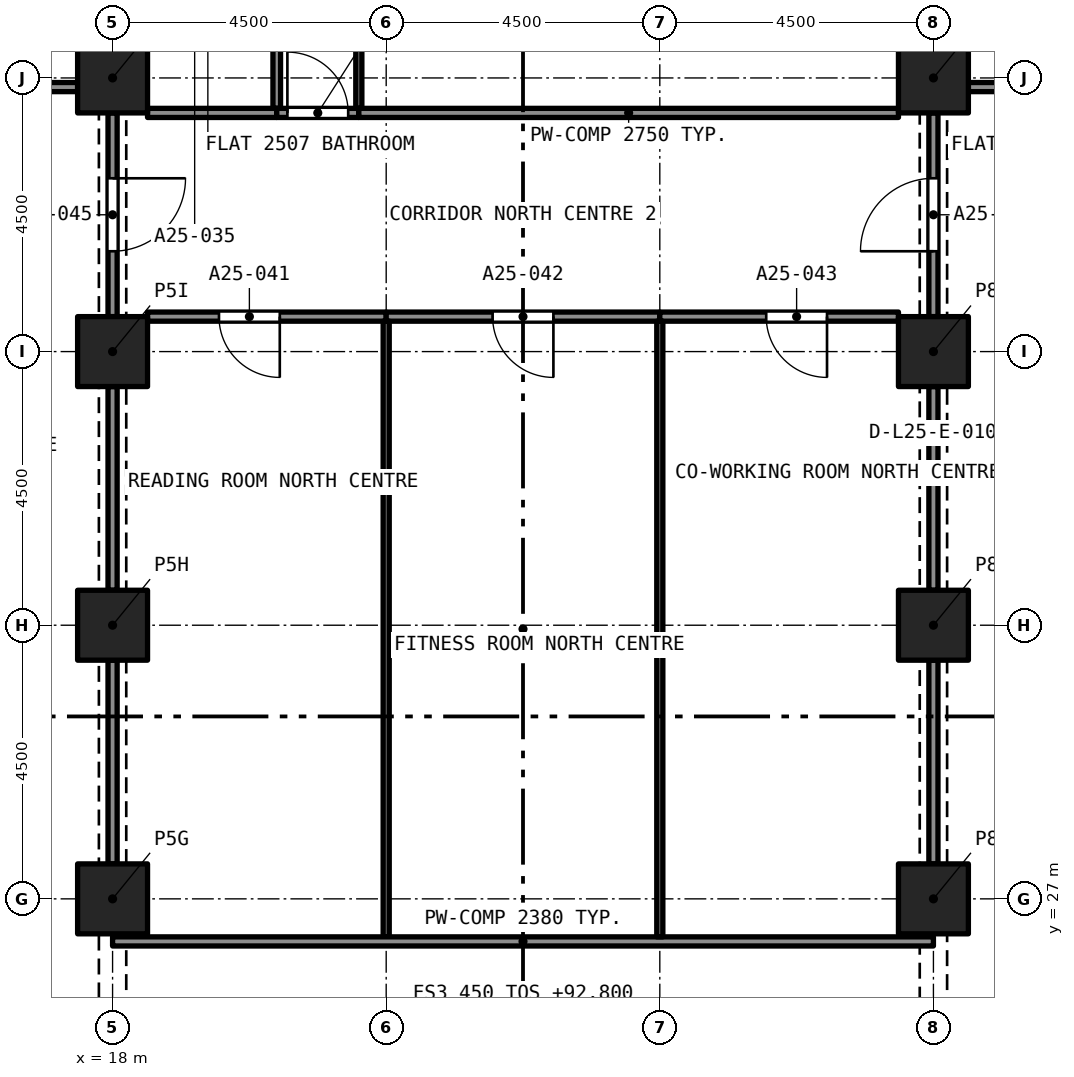
"""IFC4 building model, lengths in metres.
Left out: names, types, materials, properties, quantities, classifications, styles, units other than length and angle.
Written with IfcOpenShell. Run it as: python <this file> out.ifc"""

import sys

from ifc_helpers import new_model, si_unit, direction, frame, frame_2d, origin, origin_2d, place, context, subcontext, project, spatial, rectangle, extrude, element, fill, save


model = new_model("IFC4")
c1 = context("Model", 3, precision=1e-05, world=origin(), true_north=direction((0.0, 1.0)))
c2 = subcontext(c1, "Body", "Model", "MODEL_VIEW")
j1 = project(units=[si_unit("LENGTHUNIT", "METRE"), si_unit("PLANEANGLEUNIT", "RADIAN")], contexts=[c1])
p1 = place(None, origin())
s1 = spatial("IfcSite", under=j1, at=p1, CompositionType="ELEMENT")
p2 = place(p1, origin())
s2 = spatial("IfcBuilding", under=s1, at=p2, CompositionType="ELEMENT")
p3 = place(p2, frame((0.0, 0.0, 92.8)))
s3 = spatial("IfcBuildingStorey", under=s2, at=p3, CompositionType="ELEMENT", Elevation=92.8)
for number, where, z_axis, x_axis in (
    (1, (18.0, 27.0, 0.0), (0.0, 0.0, 1.0), (1.0, 0.0, 0.0)),
    (2, (31.5, 27.0, 0.0), (0.0, 0.0, 1.0), (1.0, 0.0, 0.0)),
    (3, (18.0, 31.5, 0.0), (0.0, 0.0, 1.0), (1.0, 0.0, 0.0)),
    (4, (31.5, 31.5, 0.0), (0.0, 0.0, 1.0), (1.0, 0.0, 0.0)),
    (5, (18.0, 36.0, 0.0), (0.0, 0.0, 1.0), (1.0, 0.0, 0.0)),
    (6, (31.5, 36.0, 0.0), (0.0, 0.0, 1.0), (1.0, 0.0, 0.0)),
    (7, (18.0, 40.5, 0.0), (0.0, 0.0, 1.0), (1.0, 0.0, 0.0)),
    (8, (31.5, 40.5, 0.0), (0.0, 0.0, 1.0), (1.0, 0.0, 0.0)),
):
    element("IfcColumn", number, at=place(p3, frame(where, z_axis=z_axis, x_axis=x_axis)), inside=s3, PredefinedType="COLUMN", context=c2, shape_type="SweptSolid", body=[
        extrude(rectangle(XDim=1.15, YDim=1.15, at=origin_2d()), origin(), (0.0, 0.0, 1.0), 3.2),
    ])
p4 = place(p3, frame((13.35, 40.35, 0.0), z_axis=(0.0, 0.0, 1.0), x_axis=(1.0, 0.0, 0.0)))
e9 = element("IfcWall", 9, at=p4, inside=s3, PredefinedType="PARTITIONING", context=c2, shape_type="SweptSolid", body=[
    extrude(rectangle(XDim=4.075, YDim=0.15, at=frame_2d((2.038, 0.0))), origin(), (0.0, 0.0, 1.0), 2.9),
])
p5 = place(p3, frame((32.075, 40.35, 0.0), z_axis=(0.0, 0.0, 1.0), x_axis=(1.0, 0.0, 0.0)))
e10 = element("IfcWall", 10, at=p5, inside=s3, PredefinedType="PARTITIONING", context=c2, shape_type="SweptSolid", body=[
    extrude(rectangle(XDim=2.35, YDim=0.15, at=frame_2d((1.175, 0.0))), origin(), (0.0, 0.0, 1.0), 2.9),
])
p6 = place(p5, frame((1.175, 0.0, 0.0)))
e11 = element("IfcOpeningElement", 11, at=p6, cuts=e10, PredefinedType="OPENING", context=c2, shape_type="SweptSolid", body=[
    extrude(rectangle(XDim=1.0, YDim=2.1, at=frame_2d((0.5, 1.05))), frame((0.0, 0.085, 0.0), z_axis=(0.0, -1.0, 0.0), x_axis=(1.0, 0.0, 0.0)), (0.0, 0.0, 1.0), 0.17),
])
p7 = place(p3, frame((20.7, 40.0, 0.0), z_axis=(0.0, 0.0, 1.0), x_axis=(0.0, 1.0, 0.0)))
e12 = element("IfcWall", 12, at=p7, inside=s3, PredefinedType="PARTITIONING", context=c2, shape_type="SweptSolid", body=[
    extrude(rectangle(XDim=2.073, YDim=0.125, at=frame_2d((1.036, 0.0))), origin(), (0.0, 0.0, 1.0), 2.75),
])
p8 = place(p3, frame((18.575, 39.925, 0.0), z_axis=(0.0, 0.0, 1.0), x_axis=(1.0, 0.0, 0.0)))
e13 = element("IfcWall", 13, at=p8, inside=s3, PredefinedType="PARTITIONING", context=c2, shape_type="SweptSolid", body=[
    extrude(rectangle(XDim=2.125, YDim=0.15, at=frame_2d((1.062, 0.0))), origin(), (0.0, 0.0, 1.0), 2.75),
])
p9 = place(p3, frame((22.05, 40.0, 0.0), z_axis=(0.0, 0.0, 1.0), x_axis=(0.0, 1.0, 0.0)))
e14 = element("IfcWall", 14, at=p9, inside=s3, PredefinedType="PARTITIONING", context=c2, shape_type="SweptSolid", body=[
    extrude(rectangle(XDim=2.085, YDim=0.1, at=frame_2d((1.042, 0.0))), origin(), (0.0, 0.0, 1.0), 2.75),
])
p10 = place(p3, frame((20.7, 39.925, 0.0), z_axis=(0.0, 0.0, 1.0), x_axis=(1.0, 0.0, 0.0)))
e15 = element("IfcWall", 15, at=p10, inside=s3, PredefinedType="PARTITIONING", context=c2, shape_type="SweptSolid", body=[
    extrude(rectangle(XDim=1.35, YDim=0.15, at=frame_2d((0.675, 0.0))), origin(), (0.0, 0.0, 1.0), 2.75),
])
p11 = place(p10, frame((0.175, 0.0, 0.0)))
e16 = element("IfcOpeningElement", 16, at=p11, cuts=e15, PredefinedType="OPENING", context=c2, shape_type="SweptSolid", body=[
    extrude(rectangle(XDim=1.0, YDim=2.1, at=frame_2d((0.5, 1.05))), frame((0.0, 0.085, 0.0), z_axis=(0.0, -1.0, 0.0), x_axis=(1.0, 0.0, 0.0)), (0.0, 0.0, 1.0), 0.17),
])
p12 = place(p3, frame((22.05, 39.925, 0.0), z_axis=(0.0, 0.0, 1.0), x_axis=(1.0, 0.0, 0.0)))
e17 = element("IfcWall", 17, at=p12, inside=s3, PredefinedType="PARTITIONING", context=c2, shape_type="SweptSolid", body=[
    extrude(rectangle(XDim=8.875, YDim=0.15, at=frame_2d((4.438, 0.0))), origin(), (0.0, 0.0, 1.0), 2.75),
])
p13 = place(p3, frame((22.5, 36.575, 0.0), z_axis=(0.0, 0.0, 1.0), x_axis=(-1.0, 0.0, 0.0)))
e18 = element("IfcWall", 18, at=p13, inside=s3, PredefinedType="PARTITIONING", context=c2, shape_type="SweptSolid", body=[
    extrude(rectangle(XDim=3.925, YDim=0.15, at=frame_2d((1.962, 0.0))), origin(), (0.0, 0.0, 1.0), 2.75),
])
p14 = place(p13, frame((1.75, 0.0, 0.0)))
e19 = element("IfcOpeningElement", 19, at=p14, cuts=e18, PredefinedType="OPENING", context=c2, shape_type="SweptSolid", body=[
    extrude(rectangle(XDim=1.0, YDim=2.1, at=frame_2d((0.5, 1.05))), frame((0.0, 0.085, 0.0), z_axis=(0.0, -1.0, 0.0), x_axis=(1.0, 0.0, 0.0)), (0.0, 0.0, 1.0), 0.17),
])
p15 = place(p3, frame((27.0, 36.575, 0.0), z_axis=(0.0, 0.0, 1.0), x_axis=(-1.0, 0.0, 0.0)))
e20 = element("IfcWall", 20, at=p15, inside=s3, PredefinedType="PARTITIONING", context=c2, shape_type="SweptSolid", body=[
    extrude(rectangle(XDim=4.5, YDim=0.15, at=frame_2d((2.25, 0.0))), origin(), (0.0, 0.0, 1.0), 2.75),
])
p16 = place(p15, frame((1.75, 0.0, 0.0)))
e21 = element("IfcOpeningElement", 21, at=p16, cuts=e20, PredefinedType="OPENING", context=c2, shape_type="SweptSolid", body=[
    extrude(rectangle(XDim=1.0, YDim=2.1, at=frame_2d((0.5, 1.05))), frame((0.0, 0.085, 0.0), z_axis=(0.0, -1.0, 0.0), x_axis=(1.0, 0.0, 0.0)), (0.0, 0.0, 1.0), 0.17),
])
p17 = place(p3, frame((30.925, 36.575, 0.0), z_axis=(0.0, 0.0, 1.0), x_axis=(-1.0, 0.0, 0.0)))
e22 = element("IfcWall", 22, at=p17, inside=s3, PredefinedType="PARTITIONING", context=c2, shape_type="SweptSolid", body=[
    extrude(rectangle(XDim=3.925, YDim=0.15, at=frame_2d((1.962, 0.0))), origin(), (0.0, 0.0, 1.0), 2.75),
])
p18 = place(p17, frame((1.175, 0.0, 0.0)))
e23 = element("IfcOpeningElement", 23, at=p18, cuts=e22, PredefinedType="OPENING", context=c2, shape_type="SweptSolid", body=[
    extrude(rectangle(XDim=1.0, YDim=2.1, at=frame_2d((0.5, 1.05))), frame((0.0, 0.085, 0.0), z_axis=(0.0, -1.0, 0.0), x_axis=(1.0, 0.0, 0.0)), (0.0, 0.0, 1.0), 0.17),
])
p19 = place(p3, frame((31.5, 36.575, 0.0), z_axis=(0.0, 0.0, 1.0), x_axis=(0.0, 1.0, 0.0)))
e24 = element("IfcWall", 24, at=p19, inside=s3, PredefinedType="PARTITIONING", context=c2, shape_type="SweptSolid", body=[
    extrude(rectangle(XDim=3.35, YDim=0.15, at=frame_2d((1.675, 0.0))), origin(), (0.0, 0.0, 1.0), 2.38),
])
p20 = place(p19, frame((1.075, 0.0, 0.0)))
e25 = element("IfcOpeningElement", 25, at=p20, cuts=e24, PredefinedType="OPENING", context=c2, shape_type="SweptSolid", body=[
    extrude(rectangle(XDim=1.2, YDim=2.1, at=frame_2d((0.6, 1.05))), frame((0.0, 0.085, 0.0), z_axis=(0.0, -1.0, 0.0), x_axis=(1.0, 0.0, 0.0)), (0.0, 0.0, 1.0), 0.17),
])
p21 = place(p3, frame((18.0, 39.925, 0.0), z_axis=(0.0, 0.0, 1.0), x_axis=(0.0, -1.0, 0.0)))
e26 = element("IfcWall", 26, at=p21, inside=s3, PredefinedType="PARTITIONING", context=c2, shape_type="SweptSolid", body=[
    extrude(rectangle(XDim=3.35, YDim=0.15, at=frame_2d((1.675, 0.0))), origin(), (0.0, 0.0, 1.0), 2.38),
])
p22 = place(p21, frame((1.075, 0.0, 0.0)))
e27 = element("IfcOpeningElement", 27, at=p22, cuts=e26, PredefinedType="OPENING", context=c2, shape_type="SweptSolid", body=[
    extrude(rectangle(XDim=1.2, YDim=2.1, at=frame_2d((0.6, 1.05))), frame((0.0, 0.085, 0.0), z_axis=(0.0, -1.0, 0.0), x_axis=(1.0, 0.0, 0.0)), (0.0, 0.0, 1.0), 0.17),
])
p23 = place(p3, frame((22.5, 26.375, 0.0), z_axis=(0.0, 0.0, 1.0), x_axis=(0.0, 1.0, 0.0)))
e28 = element("IfcWall", 28, at=p23, inside=s3, PredefinedType="PARTITIONING", context=c2, shape_type="SweptSolid", body=[
    extrude(rectangle(XDim=10.125, YDim=0.1, at=frame_2d((5.062, 0.0))), origin(), (0.0, 0.0, 1.0), 2.75),
])
for number, where, z_axis, x_axis in (
    (29, (18.0, 27.575, 0.0), (0.0, 0.0, 1.0), (0.0, 1.0, 0.0)),
    (30, (18.0, 32.075, 0.0), (0.0, 0.0, 1.0), (0.0, 1.0, 0.0)),
):
    element("IfcWall", number, at=place(p3, frame(where, z_axis=z_axis, x_axis=x_axis)), inside=s3, PredefinedType="PARTITIONING", context=c2, shape_type="SweptSolid", body=[
        extrude(rectangle(XDim=3.35, YDim=0.15, at=frame_2d((1.675, 0.0))), origin(), (0.0, 0.0, 1.0), 2.38),
    ])
p24 = place(p3, frame((18.0, 26.3, 0.0), z_axis=(0.0, 0.0, 1.0), x_axis=(1.0, 0.0, 0.0)))
e31 = element("IfcWall", 31, at=p24, inside=s3, PredefinedType="PARTITIONING", context=c2, shape_type="SweptSolid", body=[
    extrude(rectangle(XDim=13.5, YDim=0.15, at=frame_2d((6.75, 0.0))), origin(), (0.0, 0.0, 1.0), 2.38),
])
p25 = place(p3, frame((27.0, 26.375, 0.0), z_axis=(0.0, 0.0, 1.0), x_axis=(0.0, 1.0, 0.0)))
e32 = element("IfcWall", 32, at=p25, inside=s3, PredefinedType="PARTITIONING", context=c2, shape_type="SweptSolid", body=[
    extrude(rectangle(XDim=10.125, YDim=0.1, at=frame_2d((5.062, 0.0))), origin(), (0.0, 0.0, 1.0), 2.75),
])
for number, where, z_axis, x_axis in (
    (33, (31.5, 32.075, 0.0), (0.0, 0.0, 1.0), (0.0, 1.0, 0.0)),
    (34, (31.5, 27.575, 0.0), (0.0, 0.0, 1.0), (0.0, 1.0, 0.0)),
):
    element("IfcWall", number, at=place(p3, frame(where, z_axis=z_axis, x_axis=x_axis)), inside=s3, PredefinedType="PARTITIONING", context=c2, shape_type="SweptSolid", body=[
        extrude(rectangle(XDim=3.35, YDim=0.15, at=frame_2d((1.675, 0.0))), origin(), (0.0, 0.0, 1.0), 2.38),
    ])
p26 = place(p11, origin())
e35 = element("IfcDoor", 35, at=p26, inside=s3, OperationType="SINGLE_SWING_RIGHT", PredefinedType="DOOR", context=c2, shape_type="SweptSolid", body=[
    extrude(rectangle(XDim=1.0, YDim=2.1, at=frame_2d((0.5, 1.05))), frame((0.0, 0.025, 0.0), z_axis=(0.0, -1.0, 0.0), x_axis=(1.0, 0.0, 0.0)), (0.0, 0.0, 1.0), 0.05),
])
fill(e16, e35)
p27 = place(p14, origin())
e36 = element("IfcDoor", 36, at=p27, inside=s3, OperationType="SINGLE_SWING_RIGHT", PredefinedType="DOOR", context=c2, shape_type="SweptSolid", body=[
    extrude(rectangle(XDim=1.0, YDim=2.1, at=frame_2d((0.5, 1.05))), frame((0.0, 0.025, 0.0), z_axis=(0.0, -1.0, 0.0), x_axis=(1.0, 0.0, 0.0)), (0.0, 0.0, 1.0), 0.05),
])
fill(e19, e36)
p28 = place(p16, origin())
e37 = element("IfcDoor", 37, at=p28, inside=s3, OperationType="SINGLE_SWING_RIGHT", PredefinedType="DOOR", context=c2, shape_type="SweptSolid", body=[
    extrude(rectangle(XDim=1.0, YDim=2.1, at=frame_2d((0.5, 1.05))), frame((0.0, 0.025, 0.0), z_axis=(0.0, -1.0, 0.0), x_axis=(1.0, 0.0, 0.0)), (0.0, 0.0, 1.0), 0.05),
])
fill(e21, e37)
p29 = place(p18, origin())
e38 = element("IfcDoor", 38, at=p29, inside=s3, OperationType="SINGLE_SWING_LEFT", PredefinedType="DOOR", context=c2, shape_type="SweptSolid", body=[
    extrude(rectangle(XDim=1.0, YDim=2.1, at=frame_2d((0.5, 1.05))), frame((0.0, 0.025, 0.0), z_axis=(0.0, -1.0, 0.0), x_axis=(1.0, 0.0, 0.0)), (0.0, 0.0, 1.0), 0.05),
])
fill(e23, e38)
p30 = place(p20, origin())
e39 = element("IfcDoor", 39, at=p30, inside=s3, OperationType="SINGLE_SWING_LEFT", PredefinedType="DOOR", context=c2, shape_type="SweptSolid", body=[
    extrude(rectangle(XDim=1.2, YDim=2.1, at=frame_2d((0.6, 1.05))), frame((0.0, 0.025, 0.0), z_axis=(0.0, -1.0, 0.0), x_axis=(1.0, 0.0, 0.0)), (0.0, 0.0, 1.0), 0.05),
])
fill(e25, e39)
p31 = place(p22, origin())
e40 = element("IfcDoor", 40, at=p31, inside=s3, OperationType="SINGLE_SWING_LEFT", PredefinedType="DOOR", context=c2, shape_type="SweptSolid", body=[
    extrude(rectangle(XDim=1.2, YDim=2.1, at=frame_2d((0.6, 1.05))), frame((0.0, 0.025, 0.0), z_axis=(0.0, -1.0, 0.0), x_axis=(1.0, 0.0, 0.0)), (0.0, 0.0, 1.0), 0.05),
])
fill(e27, e40)
save(model, sys.argv[1])
